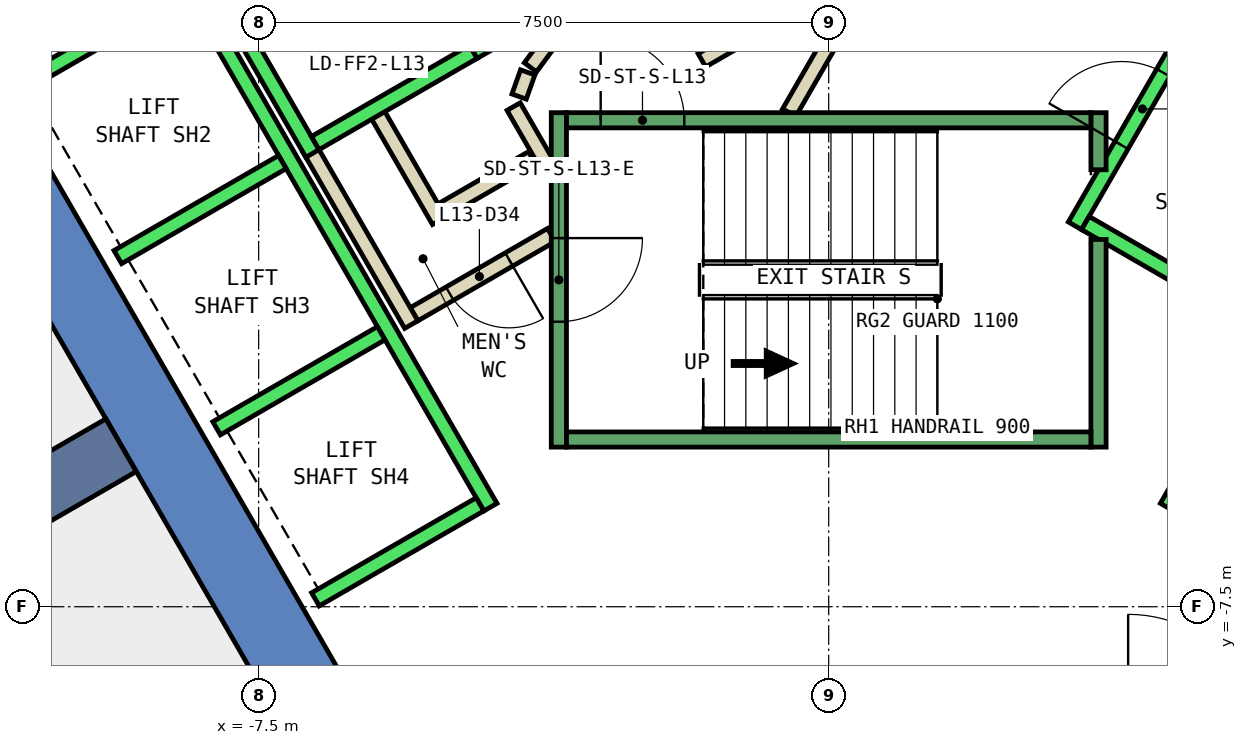
"""IFC4 building model, lengths in metres.
Left out: names, types, materials, properties, quantities, classifications, styles, units other than length and angle.
Written with IfcOpenShell. Run it as: python <this file> out.ifc"""

import sys

from ifc_helpers import new_model, si_unit, direction, frame, frame_2d, origin, place, context, subcontext, project, spatial, polyline, rectangle, outline, extrude, element, fill, save


model = new_model("IFC4")
c1 = context("Model", 3, precision=1e-05, world=origin(), true_north=direction((0.0, 1.0)))
c2 = subcontext(c1, "Body", "Model", "MODEL_VIEW")
j1 = project(units=[si_unit("LENGTHUNIT", "METRE"), si_unit("PLANEANGLEUNIT", "RADIAN")], contexts=[c1])
p1 = place(None, origin())
s1 = spatial("IfcSite", under=j1, at=p1, CompositionType="ELEMENT")
p2 = place(p1, origin())
s2 = spatial("IfcBuilding", under=s1, at=p2, CompositionType="ELEMENT")
p3 = place(p2, frame((0.0, 0.0, 64.4)))
s3 = spatial("IfcBuildingStorey", under=s2, at=p3, CompositionType="ELEMENT", Elevation=64.4)
p4 = place(p3, frame((0.0, 0.0, -0.4)))
e1 = element("IfcWall", 1, at=p4, inside=s3, PredefinedType="SHEAR", context=c2, shape_type="SweptSolid", body=[
    extrude(outline(polyline([(-13.856, 2.5), (-6.928, -9.5), (-6.351, -8.5), (-12.702, 2.5), (-13.856, 2.5)])), origin(), (0.0, 0.0, 1.0), 4.2),
])
p5 = place(p3, frame((-9.31, -5.375, -0.4), z_axis=(0.0, 0.0, 1.0), x_axis=(-0.866017533419, -0.500013631625, 0.0)))
e2 = element("IfcWall", 2, at=p5, inside=s3, PredefinedType="SHEAR", context=c2, shape_type="SweptSolid", body=[
    extrude(rectangle(XDim=9.0, YDim=0.8, at=frame_2d((4.5, 0.0))), origin(), (0.0, 0.0, 1.0), 4.2),
])
p6 = place(p3, frame((-3.9, -1.599, 0.0), z_axis=(0.0, 0.0, 1.0), x_axis=(-0.865969445389, -0.500096910261, 0.0)))
e3 = element("IfcWall", 3, at=p6, inside=s3, PredefinedType="PARTITIONING", context=c2, shape_type="SweptSolid", body=[
    extrude(rectangle(XDim=1.373, YDim=0.2, at=frame_2d((0.687, 0.0))), origin(), (0.0, 0.0, 1.0), 3.8),
])
p7 = place(p3, frame((-5.126, -2.422, 0.0), z_axis=(0.0, 0.0, 1.0), x_axis=(-0.500062241894, 0.865989465428, 0.0)))
e4 = element("IfcWall", 4, at=p7, inside=s3, PredefinedType="PARTITIONING", context=c2, shape_type="SweptSolid", body=[
    extrude(rectangle(XDim=1.7, YDim=0.2, at=frame_2d((0.85, 0.0))), origin(), (0.0, 0.0, 1.0), 3.8),
])
p8 = place(p3, frame((-3.65, -2.61, 0.0), z_axis=(0.0, 0.0, 1.0), x_axis=(-0.866072462134, -0.499918483688, 0.0)))
e5 = element("IfcWall", 5, at=p8, inside=s3, PredefinedType="PARTITIONING", context=c2, shape_type="SweptSolid", body=[
    extrude(rectangle(XDim=2.084, YDim=0.2, at=frame_2d((1.042, 0.0))), origin(), (0.0, 0.0, 1.0), 3.8),
])
p9 = place(p8, frame((0.642, 0.0, 0.0)))
e6 = element("IfcOpeningElement", 6, at=p9, cuts=e5, PredefinedType="OPENING", context=c2, shape_type="SweptSolid", body=[
    extrude(rectangle(XDim=0.9, YDim=2.1, at=frame_2d((0.45, 1.05))), frame((0.0, 0.11, 0.0), z_axis=(0.0, -1.0, 0.0), x_axis=(1.0, 0.0, 0.0)), (0.0, 0.0, 1.0), 0.22),
])
p10 = place(p3, frame((-5.492, -3.788, 0.0), z_axis=(0.0, 0.0, 1.0), x_axis=(-0.500008949224, 0.866020236886, 0.0)))
e7 = element("IfcWall", 7, at=p10, inside=s3, PredefinedType="PARTITIONING", context=c2, shape_type="SweptSolid", body=[
    extrude(rectangle(XDim=2.68, YDim=0.2, at=frame_2d((1.34, 0.0))), origin(), (0.0, 0.0, 1.0), 3.8),
])
p11 = place(p3, frame((-4.145, -0.92, 0.0), z_axis=(0.0, 0.0, 1.0), x_axis=(0.499743786207, -0.866173278362, 0.0)))
e8 = element("IfcWall", 8, at=p11, inside=s3, PredefinedType="PARTITIONING", context=c2, shape_type="SweptSolid", body=[
    extrude(rectangle(XDim=0.991, YDim=0.2, at=frame_2d((0.495, 0.0))), origin(), (0.0, 0.0, 1.0), 3.8),
])
p12 = place(p3, frame((-0.52, -1.0, 0.0), z_axis=(0.0, 0.0, 1.0), x_axis=(0.50011622646, 0.865958290007, 0.0)))
e9 = element("IfcWall", 9, at=p12, inside=s3, PredefinedType="PARTITIONING", context=c2, shape_type="SweptSolid", body=[
    extrude(rectangle(XDim=4.991, YDim=0.2, at=frame_2d((2.496, 0.0))), origin(), (0.0, 0.0, 1.0), 3.8),
])
p13 = place(p12, frame((1.945, 0.0, 0.0)))
e10 = element("IfcOpeningElement", 10, at=p13, cuts=e9, PredefinedType="OPENING", context=c2, shape_type="SweptSolid", body=[
    extrude(rectangle(XDim=1.0, YDim=2.1, at=frame_2d((0.5, 1.05))), frame((0.0, 0.11, 0.0), z_axis=(0.0, -1.0, 0.0), x_axis=(1.0, 0.0, 0.0)), (0.0, 0.0, 1.0), 0.22),
])
p14 = place(p3, frame((-0.412, 0.414, 0.0), z_axis=(0.0, 0.0, 1.0), x_axis=(-0.866017369001, -0.500013916395, 0.0)))
e11 = element("IfcWall", 11, at=p14, inside=s3, PredefinedType="PARTITIONING", context=c2, shape_type="SweptSolid", body=[
    extrude(rectangle(XDim=1.45, YDim=0.2, at=frame_2d((0.725, 0.0))), origin(), (0.0, 0.0, 1.0), 3.8),
])
p15 = place(p3, frame((-3.723, -0.131, 0.0), z_axis=(0.0, 0.0, 1.0), x_axis=(-0.594675113454, -0.803966112121, 0.0)))
e12 = element("IfcWall", 12, at=p15, inside=s3, PredefinedType="PARTITIONING", context=c2, shape_type="SweptSolid", body=[
    extrude(rectangle(XDim=0.338, YDim=0.2, at=frame_2d((0.169, 0.0))), origin(), (0.0, 0.0, 1.0), 3.8),
])
p16 = place(p3, frame((-3.96, -0.47, 0.0), z_axis=(0.0, 0.0, 1.0), x_axis=(-0.334824194261, -0.942280615813, 0.0)))
e13 = element("IfcWall", 13, at=p16, inside=s3, PredefinedType="PARTITIONING", context=c2, shape_type="SweptSolid", body=[
    extrude(rectangle(XDim=0.338, YDim=0.2, at=frame_2d((0.169, 0.0))), origin(), (0.0, 0.0, 1.0), 3.8),
])
p17 = place(p3, frame((-5.94, 2.188, 0.0), z_axis=(0.0, 0.0, 1.0), x_axis=(0.49994636267, -0.866056369097, 0.0)))
e14 = element("IfcWall", 14, at=p17, inside=s3, PredefinedType="STANDARD", context=c2, shape_type="SweptSolid", body=[
    extrude(rectangle(XDim=2.8, YDim=0.2, at=frame_2d((1.4, 0.0))), origin(), (0.0, 0.0, 1.0), 3.8),
])
p18 = place(p17, frame((1.225, 0.0, 0.0)))
e15 = element("IfcOpeningElement", 15, at=p18, cuts=e14, PredefinedType="OPENING", context=c2, shape_type="SweptSolid", body=[
    extrude(rectangle(XDim=1.1, YDim=2.1, at=frame_2d((0.55, 1.05))), frame((0.0, 0.11, 0.0), z_axis=(0.0, -1.0, 0.0), x_axis=(1.0, 0.0, 0.0)), (0.0, 0.0, 1.0), 0.22),
])
p19 = place(p3, frame((-8.192, 0.888, 0.0), z_axis=(0.0, 0.0, 1.0), x_axis=(0.49994636267, -0.866056369097, 0.0)))
e16 = element("IfcWall", 16, at=p19, inside=s3, PredefinedType="STANDARD", context=c2, shape_type="SweptSolid", body=[
    extrude(rectangle(XDim=2.8, YDim=0.2, at=frame_2d((1.4, 0.0))), origin(), (0.0, 0.0, 1.0), 3.8),
])
p20 = place(p3, frame((-4.677, -0.2, 0.0), z_axis=(0.0, 0.0, 1.0), x_axis=(-0.865973769406, -0.500089422704, 0.0)))
e17 = element("IfcWall", 17, at=p20, inside=s3, PredefinedType="STANDARD", context=c2, shape_type="SweptSolid", body=[
    extrude(rectangle(XDim=2.399, YDim=0.2, at=frame_2d((1.2, 0.0))), origin(), (0.0, 0.0, 1.0), 3.8),
])
p21 = place(p3, frame((-9.751, 2.99, 0.0), z_axis=(0.0, 0.0, 1.0), x_axis=(0.50000090737, -0.866024879913, 0.0)))
e18 = element("IfcWall", 18, at=p21, inside=s3, PredefinedType="STANDARD", context=c2, shape_type="SweptSolid", body=[
    extrude(rectangle(XDim=10.6, YDim=0.2, at=frame_2d((5.3, 0.0))), origin(), (0.0, 0.0, 1.0), 3.8),
])
for number, where, z_axis, x_axis in (
    (19, (-8.488, 0.602, 0.0), (0.0, 0.0, 1.0), (-0.866, -0.5, 0.0)),
    (20, (-7.188, -1.65, 0.0), (0.0, 0.0, 1.0), (-0.866, -0.5, 0.0)),
    (21, (-5.888, -3.902, 0.0), (0.0, 0.0, 1.0), (-0.866, -0.5, 0.0)),
    (22, (-4.588, -6.153, 0.0), (0.0, 0.0, 1.0), (-0.866, -0.5, 0.0)),
):
    element("IfcWall", number, at=place(p3, frame(where, z_axis=z_axis, x_axis=x_axis)), inside=s3, PredefinedType="STANDARD", context=c2, shape_type="SweptSolid", body=[
        extrude(rectangle(XDim=2.5, YDim=0.2, at=frame_2d((1.25, 0.0))), origin(), (0.0, 0.0, 1.0), 3.8),
    ])
p22 = place(p3, frame((3.24, -2.488, 0.0), z_axis=(0.0, 0.0, 1.0), x_axis=(0.49994636267, 0.866056369097, 0.0)))
e23 = element("IfcWall", 23, at=p22, inside=s3, PredefinedType="STANDARD", context=c2, shape_type="SweptSolid", body=[
    extrude(rectangle(XDim=2.8, YDim=0.2, at=frame_2d((1.4, 0.0))), origin(), (0.0, 0.0, 1.0), 3.8),
])
p23 = place(p22, frame((1.225, 0.0, 0.0)))
e24 = element("IfcOpeningElement", 24, at=p23, cuts=e23, PredefinedType="OPENING", context=c2, shape_type="SweptSolid", body=[
    extrude(rectangle(XDim=1.1, YDim=2.1, at=frame_2d((0.55, 1.05))), frame((0.0, 0.11, 0.0), z_axis=(0.0, -1.0, 0.0), x_axis=(1.0, 0.0, 0.0)), (0.0, 0.0, 1.0), 0.22),
])
p24 = place(p3, frame((3.377, -2.452, 0.0), z_axis=(0.0, 0.0, 1.0), x_axis=(0.865955154139, -0.50012165622, 0.0)))
e25 = element("IfcWall", 25, at=p24, inside=s3, PredefinedType="STANDARD", context=c2, shape_type="SweptSolid", body=[
    extrude(rectangle(XDim=2.4, YDim=0.2, at=frame_2d((1.2, 0.0))), origin(), (0.0, 0.0, 1.0), 3.8),
])
p25 = place(p3, frame((4.451, -6.19, 0.0), z_axis=(0.0, 0.0, 1.0), x_axis=(0.50000090737, 0.866024879913, 0.0)))
e26 = element("IfcWall", 26, at=p25, inside=s3, PredefinedType="STANDARD", context=c2, shape_type="SweptSolid", body=[
    extrude(rectangle(XDim=10.6, YDim=0.2, at=frame_2d((5.3, 0.0))), origin(), (0.0, 0.0, 1.0), 3.8),
])
p26 = place(p3, frame((-3.55, -1.0, 0.0), z_axis=(0.0, 0.0, 1.0), x_axis=(0.0, -1.0, 0.0)))
e27 = element("IfcWall", 27, at=p26, inside=s3, PredefinedType="STANDARD", context=c2, shape_type="SweptSolid", body=[
    extrude(rectangle(XDim=4.4, YDim=0.2, at=frame_2d((2.2, 0.0))), origin(), (0.0, 0.0, 1.0), 3.8),
])
p27 = place(p26, frame((1.65, 0.0, 0.0)))
e28 = element("IfcOpeningElement", 28, at=p27, cuts=e27, PredefinedType="OPENING", context=c2, shape_type="SweptSolid", body=[
    extrude(rectangle(XDim=1.1, YDim=2.2, at=frame_2d((0.55, 1.1))), frame((0.0, 0.11, 0.0), z_axis=(0.0, -1.0, 0.0), x_axis=(1.0, 0.0, 0.0)), (0.0, 0.0, 1.0), 0.22),
])
p28 = place(p3, frame((3.55, -2.667, 0.0), z_axis=(0.0, 0.0, 1.0), x_axis=(0.0, -1.0, 0.0)))
e29 = element("IfcWall", 29, at=p28, inside=s3, PredefinedType="STANDARD", context=c2, shape_type="SweptSolid", body=[
    extrude(rectangle(XDim=2.733, YDim=0.2, at=frame_2d((1.366, 0.0))), origin(), (0.0, 0.0, 1.0), 3.8),
])
p29 = place(p3, frame((3.55, -1.0, 0.0), z_axis=(0.0, 0.0, 1.0), x_axis=(0.0, -1.0, 0.0)))
e30 = element("IfcWall", 30, at=p29, inside=s3, PredefinedType="STANDARD", context=c2, shape_type="SweptSolid", body=[
    extrude(rectangle(XDim=0.751, YDim=0.2, at=frame_2d((0.375, 0.0))), origin(), (0.0, 0.0, 1.0), 3.8),
])
p30 = place(p3, frame((-3.45, -1.1, 0.0), z_axis=(0.0, 0.0, 1.0), x_axis=(1.0, 0.0, 0.0)))
e31 = element("IfcWall", 31, at=p30, inside=s3, PredefinedType="STANDARD", context=c2, shape_type="SweptSolid", body=[
    extrude(rectangle(XDim=6.9, YDim=0.2, at=frame_2d((3.45, 0.0))), origin(), (0.0, 0.0, 1.0), 3.8),
])
p31 = place(p30, frame((0.45, 0.0, 0.0)))
e32 = element("IfcOpeningElement", 32, at=p31, cuts=e31, PredefinedType="OPENING", context=c2, shape_type="SweptSolid", body=[
    extrude(rectangle(XDim=1.1, YDim=2.2, at=frame_2d((0.55, 1.1))), frame((0.0, 0.11, 0.0), z_axis=(0.0, -1.0, 0.0), x_axis=(1.0, 0.0, 0.0)), (0.0, 0.0, 1.0), 0.22),
])
p32 = place(p3, frame((-3.45, -5.3, 0.0), z_axis=(0.0, 0.0, 1.0), x_axis=(1.0, 0.0, 0.0)))
e33 = element("IfcWall", 33, at=p32, inside=s3, PredefinedType="STANDARD", context=c2, shape_type="SweptSolid", body=[
    extrude(rectangle(XDim=6.9, YDim=0.2, at=frame_2d((3.45, 0.0))), origin(), (0.0, 0.0, 1.0), 3.8),
])
p33 = place(p9, origin())
e34 = element("IfcDoor", 34, at=p33, inside=s3, OperationType="SINGLE_SWING_LEFT", PredefinedType="DOOR", context=c2, shape_type="SweptSolid", body=[
    extrude(rectangle(XDim=0.9, YDim=2.1, at=frame_2d((0.45, 1.05))), frame((0.0, 0.025, 0.0), z_axis=(0.0, -1.0, 0.0), x_axis=(1.0, 0.0, 0.0)), (0.0, 0.0, 1.0), 0.05),
])
fill(e6, e34)
p34 = place(p23, origin())
e35 = element("IfcDoor", 35, at=p34, inside=s3, OperationType="SLIDING_TO_LEFT", PredefinedType="DOOR", context=c2, shape_type="SweptSolid", body=[
    extrude(rectangle(XDim=1.1, YDim=2.1, at=frame_2d((0.55, 1.05))), frame((0.0, 0.025, 0.0), z_axis=(0.0, -1.0, 0.0), x_axis=(1.0, 0.0, 0.0)), (0.0, 0.0, 1.0), 0.05),
])
fill(e24, e35)
p35 = place(p31, origin())
e36 = element("IfcDoor", 36, at=p35, inside=s3, OperationType="SINGLE_SWING_LEFT", PredefinedType="DOOR", context=c2, shape_type="SweptSolid", body=[
    extrude(rectangle(XDim=1.1, YDim=2.2, at=frame_2d((0.55, 1.1))), frame((0.0, 0.025, 0.0), z_axis=(0.0, -1.0, 0.0), x_axis=(1.0, 0.0, 0.0)), (0.0, 0.0, 1.0), 0.05),
])
fill(e32, e36)
p36 = place(p27, origin())
e37 = element("IfcDoor", 37, at=p36, inside=s3, OperationType="SINGLE_SWING_LEFT", PredefinedType="DOOR", context=c2, shape_type="SweptSolid", body=[
    extrude(rectangle(XDim=1.1, YDim=2.2, at=frame_2d((0.55, 1.1))), frame((0.0, 0.025, 0.0), z_axis=(0.0, -1.0, 0.0), x_axis=(1.0, 0.0, 0.0)), (0.0, 0.0, 1.0), 0.05),
])
fill(e28, e37)
save(model, sys.argv[1])
